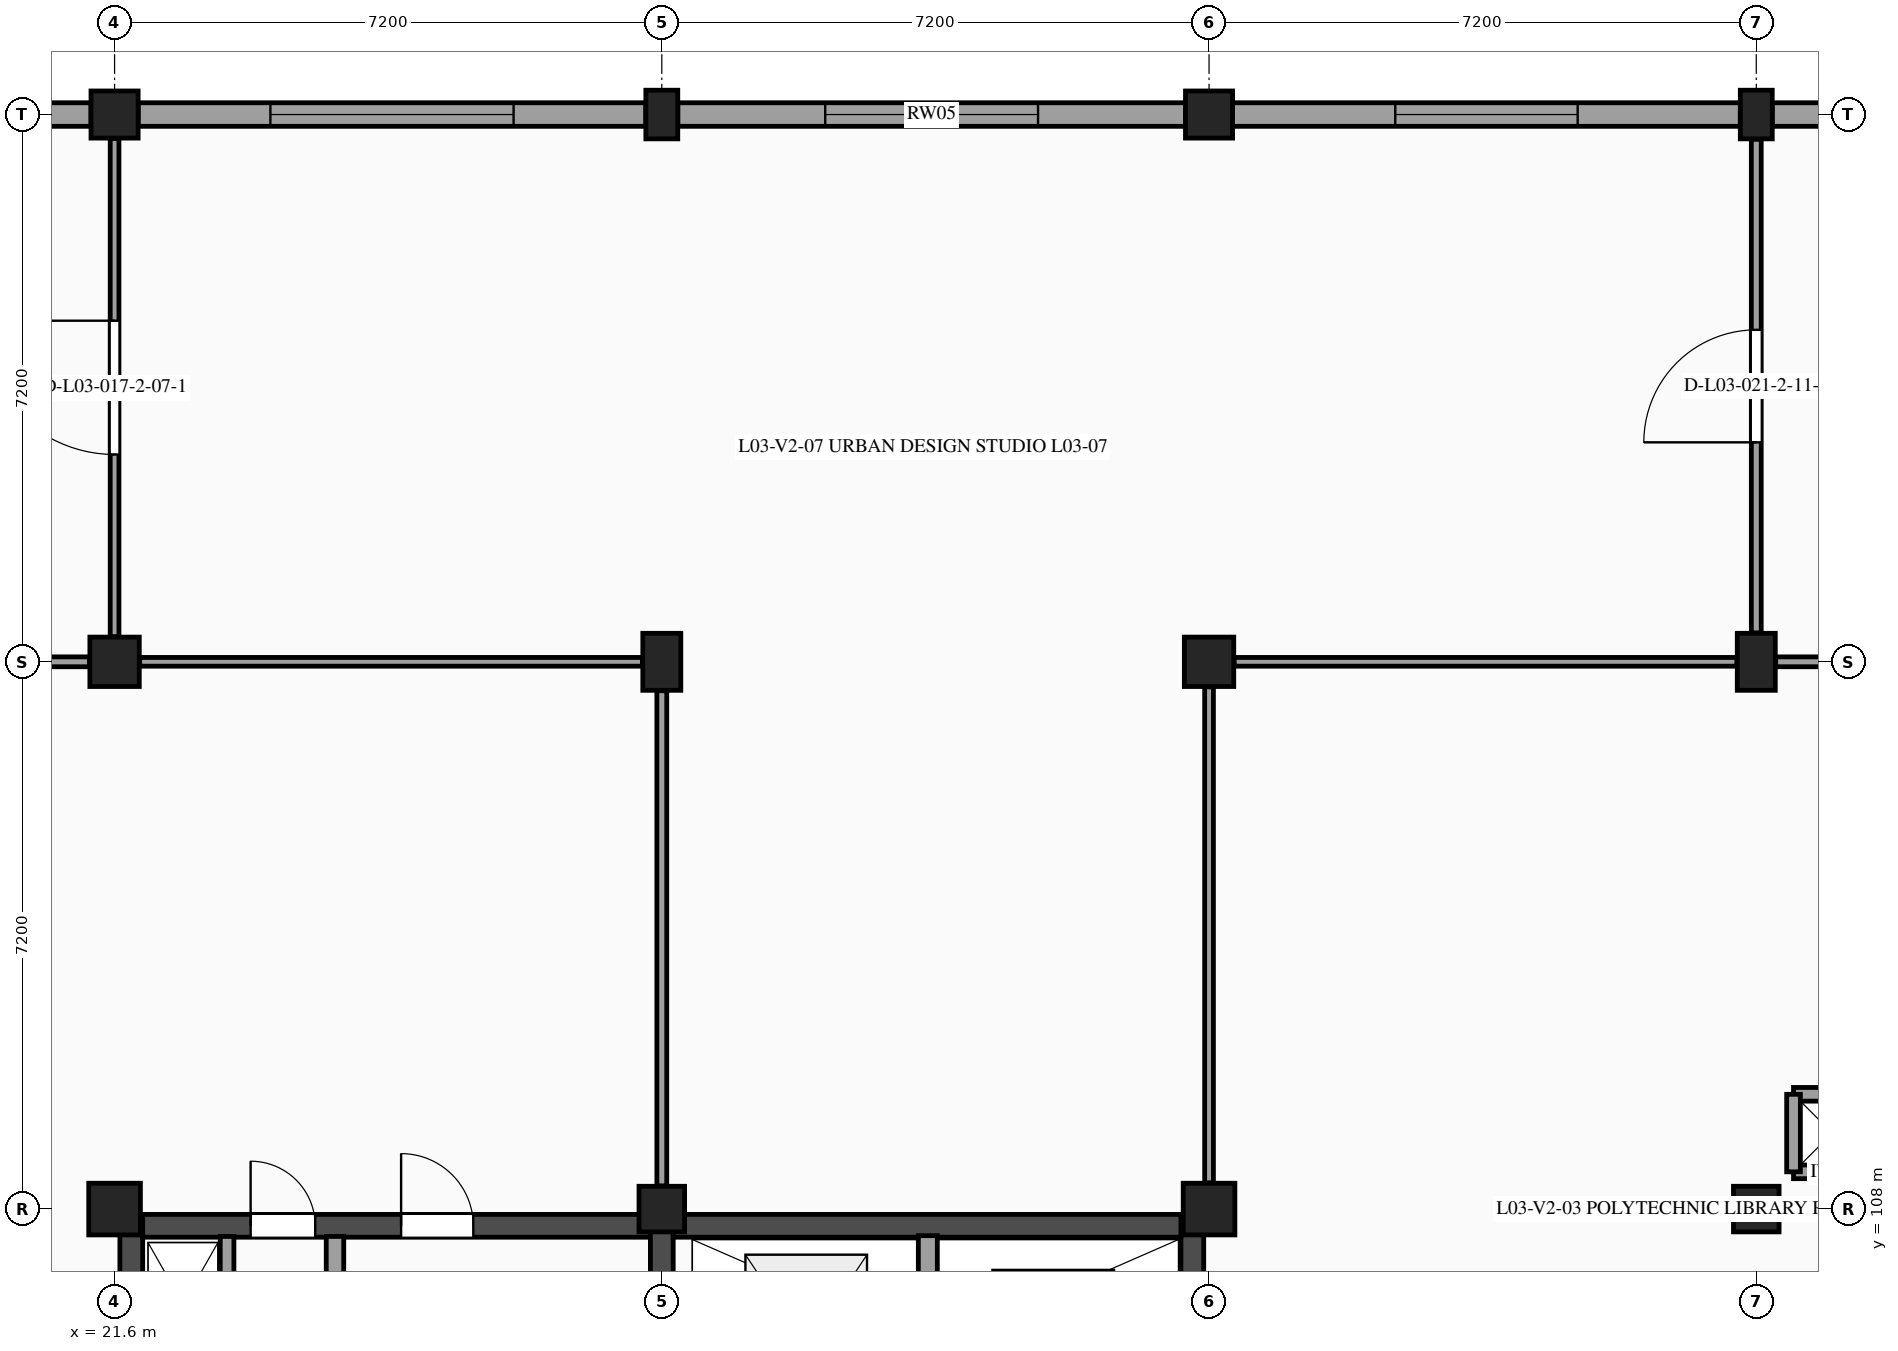
"""IFC4 building model, lengths in metres.
Left out: names, types, materials, properties, quantities, classifications, styles, units other than length and angle.
Written with IfcOpenShell. Run it as: python <this file> out.ifc"""

import sys

from ifc_helpers import new_model, si_unit, direction, frame, frame_2d, origin, origin_2d, place, context, subcontext, project, spatial, rectangle, extrude, element, fill, save


model = new_model("IFC4")
c1 = context("Model", 3, precision=1e-05, world=origin(), true_north=direction((0.0, 1.0)))
c2 = subcontext(c1, "Body", "Model", "MODEL_VIEW")
j1 = project(units=[si_unit("LENGTHUNIT", "METRE"), si_unit("PLANEANGLEUNIT", "RADIAN")], contexts=[c1])
p1 = place(None, origin())
s1 = spatial("IfcSite", under=j1, at=p1, CompositionType="ELEMENT")
p2 = place(p1, origin())
s2 = spatial("IfcBuilding", under=s1, at=p2, CompositionType="ELEMENT")
p3 = place(p2, frame((0.0, 0.0, 14.4)))
s3 = spatial("IfcBuildingStorey", under=s2, at=p3, CompositionType="ELEMENT", Elevation=14.4)
p4 = place(p3, frame((21.6, 108.0, 0.0), z_axis=(0.0, 0.0, 1.0), x_axis=(1.0, 0.0, 0.0)))
e1 = element("IfcColumn", 1, at=p4, inside=s3, PredefinedType="COLUMN", context=c2, shape_type="SweptSolid", body=[
    extrude(rectangle(XDim=0.68, YDim=0.68, at=origin_2d()), origin(), (0.0, 0.0, 1.0), 4.2),
])
p5 = place(p3, frame((21.6, 115.2, 0.0), z_axis=(0.0, 0.0, 1.0), x_axis=(1.0, 0.0, 0.0)))
e2 = element("IfcColumn", 2, at=p5, inside=s3, PredefinedType="COLUMN", context=c2, shape_type="SweptSolid", body=[
    extrude(rectangle(XDim=0.65, YDim=0.65, at=origin_2d()), origin(), (0.0, 0.0, 1.0), 4.2),
])
p6 = place(p3, frame((21.6, 122.4, 0.0), z_axis=(0.0, 0.0, 1.0), x_axis=(1.0, 0.0, 0.0)))
e3 = element("IfcColumn", 3, at=p6, inside=s3, PredefinedType="COLUMN", context=c2, shape_type="SweptSolid", body=[
    extrude(rectangle(XDim=0.62, YDim=0.62, at=origin_2d()), origin(), (0.0, 0.0, 1.0), 4.2),
])
p7 = place(p3, frame((28.8, 108.0, 0.0), z_axis=(0.0, 0.0, 1.0), x_axis=(1.0, 0.0, 0.0)))
e4 = element("IfcColumn", 4, at=p7, inside=s3, PredefinedType="COLUMN", context=c2, shape_type="SweptSolid", body=[
    extrude(rectangle(XDim=0.6, YDim=0.6, at=origin_2d()), origin(), (0.0, 0.0, 1.0), 4.2),
])
p8 = place(p3, frame((28.8, 115.2, 0.0), z_axis=(0.0, 0.0, 1.0), x_axis=(1.0, 0.0, 0.0)))
e5 = element("IfcColumn", 5, at=p8, inside=s3, PredefinedType="COLUMN", context=c2, shape_type="SweptSolid", body=[
    extrude(rectangle(XDim=0.5, YDim=0.75, at=origin_2d()), origin(), (0.0, 0.0, 1.0), 4.2),
])
p9 = place(p3, frame((28.8, 122.4, 0.0), z_axis=(0.0, 0.0, 1.0), x_axis=(1.0, 0.0, 0.0)))
e6 = element("IfcColumn", 6, at=p9, inside=s3, PredefinedType="PILASTER", context=c2, shape_type="SweptSolid", body=[
    extrude(rectangle(XDim=0.42, YDim=0.64, at=origin_2d()), origin(), (0.0, 0.0, 1.0), 4.2),
])
p10 = place(p3, frame((36.0, 108.0, 0.0), z_axis=(0.0, 0.0, 1.0), x_axis=(1.0, 0.0, 0.0)))
e7 = element("IfcColumn", 7, at=p10, inside=s3, PredefinedType="COLUMN", context=c2, shape_type="SweptSolid", body=[
    extrude(rectangle(XDim=0.68, YDim=0.68, at=origin_2d()), origin(), (0.0, 0.0, 1.0), 4.2),
])
p11 = place(p3, frame((36.0, 115.2, 0.0), z_axis=(0.0, 0.0, 1.0), x_axis=(1.0, 0.0, 0.0)))
e8 = element("IfcColumn", 8, at=p11, inside=s3, PredefinedType="COLUMN", context=c2, shape_type="SweptSolid", body=[
    extrude(rectangle(XDim=0.65, YDim=0.65, at=origin_2d()), origin(), (0.0, 0.0, 1.0), 4.2),
])
p12 = place(p3, frame((36.0, 122.4, 0.0), z_axis=(0.0, 0.0, 1.0), x_axis=(1.0, 0.0, 0.0)))
e9 = element("IfcColumn", 9, at=p12, inside=s3, PredefinedType="COLUMN", context=c2, shape_type="SweptSolid", body=[
    extrude(rectangle(XDim=0.62, YDim=0.62, at=origin_2d()), origin(), (0.0, 0.0, 1.0), 4.2),
])
p13 = place(p3, frame((43.2, 108.0, 0.0), z_axis=(0.0, 0.0, 1.0), x_axis=(1.0, 0.0, 0.0)))
e10 = element("IfcColumn", 10, at=p13, inside=s3, PredefinedType="COLUMN", context=c2, shape_type="SweptSolid", body=[
    extrude(rectangle(XDim=0.6, YDim=0.6, at=origin_2d()), origin(), (0.0, 0.0, 1.0), 4.2),
])
p14 = place(p3, frame((43.2, 115.2, 0.0), z_axis=(0.0, 0.0, 1.0), x_axis=(1.0, 0.0, 0.0)))
e11 = element("IfcColumn", 11, at=p14, inside=s3, PredefinedType="COLUMN", context=c2, shape_type="SweptSolid", body=[
    extrude(rectangle(XDim=0.5, YDim=0.75, at=origin_2d()), origin(), (0.0, 0.0, 1.0), 4.2),
])
p15 = place(p3, frame((43.2, 122.4, 0.0), z_axis=(0.0, 0.0, 1.0), x_axis=(1.0, 0.0, 0.0)))
e12 = element("IfcColumn", 12, at=p15, inside=s3, PredefinedType="PILASTER", context=c2, shape_type="SweptSolid", body=[
    extrude(rectangle(XDim=0.42, YDim=0.64, at=origin_2d()), origin(), (0.0, 0.0, 1.0), 4.2),
])
p16 = place(p3, frame((14.61, 122.4, 0.0), z_axis=(0.0, 0.0, 1.0), x_axis=(1.0, 0.0, 0.0)))
e13 = element("IfcWall", 13, at=p16, inside=s3, PredefinedType="STANDARD", context=c2, shape_type="SweptSolid", body=[
    extrude(rectangle(XDim=6.68, YDim=0.31, at=frame_2d((3.34, 0.0))), origin(), (0.0, 0.0, 1.0), 3.185),
])
p17 = place(p16, frame((1.54, 0.0, 0.98)))
e14 = element("IfcOpeningElement", 14, at=p17, cuts=e13, PredefinedType="OPENING", context=c2, shape_type="SweptSolid", body=[
    extrude(rectangle(XDim=3.6, YDim=1.5, at=frame_2d((1.8, 0.75))), frame((0.0, 0.165, 0.0), z_axis=(0.0, -1.0, 0.0), x_axis=(1.0, 0.0, 0.0)), (0.0, 0.0, 1.0), 0.33),
])
p18 = place(p3, frame((21.91, 122.4, 0.0), z_axis=(0.0, 0.0, 1.0), x_axis=(1.0, 0.0, 0.0)))
e15 = element("IfcWall", 15, at=p18, inside=s3, PredefinedType="STANDARD", context=c2, shape_type="SweptSolid", body=[
    extrude(rectangle(XDim=6.68, YDim=0.31, at=frame_2d((3.34, 0.0))), origin(), (0.0, 0.0, 1.0), 3.185),
])
p19 = place(p18, frame((1.74, 0.0, 0.98)))
e16 = element("IfcOpeningElement", 16, at=p19, cuts=e15, PredefinedType="OPENING", context=c2, shape_type="SweptSolid", body=[
    extrude(rectangle(XDim=3.2, YDim=1.45, at=frame_2d((1.6, 0.725))), frame((0.0, 0.165, 0.0), z_axis=(0.0, -1.0, 0.0), x_axis=(1.0, 0.0, 0.0)), (0.0, 0.0, 1.0), 0.33),
])
p20 = place(p3, frame((29.01, 122.4, 0.0), z_axis=(0.0, 0.0, 1.0), x_axis=(1.0, 0.0, 0.0)))
e17 = element("IfcWall", 17, at=p20, inside=s3, PredefinedType="STANDARD", context=c2, shape_type="SweptSolid", body=[
    extrude(rectangle(XDim=6.68, YDim=0.31, at=frame_2d((3.34, 0.0))), origin(), (0.0, 0.0, 1.0), 3.185),
])
p21 = place(p20, frame((1.94, 0.0, 0.98)))
e18 = element("IfcOpeningElement", 18, at=p21, cuts=e17, PredefinedType="OPENING", context=c2, shape_type="SweptSolid", body=[
    extrude(rectangle(XDim=2.8, YDim=1.45, at=frame_2d((1.4, 0.725))), frame((0.0, 0.165, 0.0), z_axis=(0.0, -1.0, 0.0), x_axis=(1.0, 0.0, 0.0)), (0.0, 0.0, 1.0), 0.33),
])
p22 = place(p3, frame((36.31, 122.4, 0.0), z_axis=(0.0, 0.0, 1.0), x_axis=(1.0, 0.0, 0.0)))
e19 = element("IfcWall", 19, at=p22, inside=s3, PredefinedType="STANDARD", context=c2, shape_type="SweptSolid", body=[
    extrude(rectangle(XDim=6.68, YDim=0.31, at=frame_2d((3.34, 0.0))), origin(), (0.0, 0.0, 1.0), 3.185),
])
p23 = place(p22, frame((2.14, 0.0, 0.98)))
e20 = element("IfcOpeningElement", 20, at=p23, cuts=e19, PredefinedType="OPENING", context=c2, shape_type="SweptSolid", body=[
    extrude(rectangle(XDim=2.4, YDim=1.4, at=frame_2d((1.2, 0.7))), frame((0.0, 0.165, 0.0), z_axis=(0.0, -1.0, 0.0), x_axis=(1.0, 0.0, 0.0)), (0.0, 0.0, 1.0), 0.33),
])
p24 = place(p3, frame((43.41, 122.4, 0.0), z_axis=(0.0, 0.0, 1.0), x_axis=(1.0, 0.0, 0.0)))
e21 = element("IfcWall", 21, at=p24, inside=s3, PredefinedType="STANDARD", context=c2, shape_type="SweptSolid", body=[
    extrude(rectangle(XDim=6.68, YDim=0.31, at=frame_2d((3.34, 0.0))), origin(), (0.0, 0.0, 1.0), 3.185),
])
p25 = place(p24, frame((0.94, 0.0, 0.98)))
e22 = element("IfcOpeningElement", 22, at=p25, cuts=e21, PredefinedType="OPENING", context=c2, shape_type="SweptSolid", body=[
    extrude(rectangle(XDim=4.8, YDim=1.8, at=frame_2d((2.4, 0.9))), frame((0.0, 0.165, 0.0), z_axis=(0.0, -1.0, 0.0), x_axis=(1.0, 0.0, 0.0)), (0.0, 0.0, 1.0), 0.33),
])
p26 = place(p3, frame((21.82, 107.93, 0.0), z_axis=(0.0, 0.0, 1.0), x_axis=(0.0, -1.0, 0.0)))
e23 = element("IfcWall", 23, at=p26, inside=s3, PredefinedType="SHEAR", context=c2, shape_type="SweptSolid", body=[
    extrude(rectangle(XDim=7.06, YDim=0.3, at=frame_2d((3.53, 0.0))), origin(), (0.0, 0.0, 1.0), 3.94),
])
p27 = place(p3, frame((21.97, 107.78, 0.0), z_axis=(0.0, 0.0, 1.0), x_axis=(1.0, 0.0, 0.0)))
e24 = element("IfcWall", 24, at=p27, inside=s3, PredefinedType="SHEAR", context=c2, shape_type="SweptSolid", body=[
    extrude(rectangle(XDim=6.68, YDim=0.3, at=frame_2d((3.34, 0.0))), origin(), (0.0, 0.0, 1.0), 3.94),
])
p28 = place(p27, frame((1.42, 0.0, 0.0)))
e25 = element("IfcOpeningElement", 25, at=p28, cuts=e24, PredefinedType="OPENING", context=c2, shape_type="SweptSolid", body=[
    extrude(rectangle(XDim=0.85, YDim=2.1, at=frame_2d((0.425, 1.05))), frame((0.0, 0.16, 0.0), z_axis=(0.0, -1.0, 0.0), x_axis=(1.0, 0.0, 0.0)), (0.0, 0.0, 1.0), 0.32),
])
p29 = place(p27, frame((3.4, 0.0, 0.0)))
e26 = element("IfcOpeningElement", 26, at=p29, cuts=e24, PredefinedType="OPENING", context=c2, shape_type="SweptSolid", body=[
    extrude(rectangle(XDim=0.95, YDim=2.15, at=frame_2d((0.475, 1.075))), frame((0.0, 0.16, 0.0), z_axis=(0.0, -1.0, 0.0), x_axis=(1.0, 0.0, 0.0)), (0.0, 0.0, 1.0), 0.32),
])
p30 = place(p3, frame((24.5, 105.9, 0.0), z_axis=(0.0, 0.0, 1.0), x_axis=(0.0, 1.0, 0.0)))
e27 = element("IfcWall", 27, at=p30, inside=s3, PredefinedType="PARTITIONING", context=c2, shape_type="SweptSolid", body=[
    extrude(rectangle(XDim=1.74, YDim=0.23, at=frame_2d((0.87, 0.0))), origin(), (0.0, 0.0, 1.0), 3.94),
])
p31 = place(p3, frame((23.08, 105.88, 0.0), z_axis=(0.0, 0.0, 1.0), x_axis=(0.0, 1.0, 0.0)))
e28 = element("IfcWall", 28, at=p31, inside=s3, PredefinedType="PARTITIONING", context=c2, shape_type="SweptSolid", body=[
    extrude(rectangle(XDim=1.76, YDim=0.18, at=frame_2d((0.88, 0.0))), origin(), (0.0, 0.0, 1.0), 3.94),
])
p32 = place(p3, frame((28.8, 100.87, 0.0), z_axis=(0.0, 0.0, 1.0), x_axis=(0.0, 1.0, 0.0)))
e29 = element("IfcWall", 29, at=p32, inside=s3, PredefinedType="SHEAR", context=c2, shape_type="SweptSolid", body=[
    extrude(rectangle(XDim=7.06, YDim=0.3, at=frame_2d((3.53, 0.0))), origin(), (0.0, 0.0, 1.0), 3.94),
])
p33 = place(p32, frame((1.4, 0.0, 0.0)))
e30 = element("IfcOpeningElement", 30, at=p33, cuts=e29, PredefinedType="OPENING", context=c2, shape_type="SweptSolid", body=[
    extrude(rectangle(XDim=1.8, YDim=2.2, at=frame_2d((0.9, 1.1))), frame((0.0, 0.16, 0.0), z_axis=(0.0, -1.0, 0.0), x_axis=(1.0, 0.0, 0.0)), (0.0, 0.0, 1.0), 0.32),
])
p34 = place(p3, frame((35.78, 100.87, 0.0), z_axis=(0.0, 0.0, 1.0), x_axis=(0.0, 1.0, 0.0)))
e31 = element("IfcWall", 31, at=p34, inside=s3, PredefinedType="SHEAR", context=c2, shape_type="SweptSolid", body=[
    extrude(rectangle(XDim=7.06, YDim=0.3, at=frame_2d((3.53, 0.0))), origin(), (0.0, 0.0, 1.0), 3.94),
])
p35 = place(p3, frame((28.95, 107.78, 0.0), z_axis=(0.0, 0.0, 1.0), x_axis=(1.0, 0.0, 0.0)))
e32 = element("IfcWall", 32, at=p35, inside=s3, PredefinedType="SHEAR", context=c2, shape_type="SweptSolid", body=[
    extrude(rectangle(XDim=6.68, YDim=0.3, at=frame_2d((3.34, 0.0))), origin(), (0.0, 0.0, 1.0), 3.94),
])
p36 = place(p3, frame((32.3, 104.78, 0.0), z_axis=(0.0, 0.0, 1.0), x_axis=(0.0, 1.0, 0.0)))
e33 = element("IfcWall", 33, at=p36, inside=s3, PredefinedType="PARTITIONING", context=c2, shape_type="SweptSolid", body=[
    extrude(rectangle(XDim=2.87, YDim=0.25, at=frame_2d((1.435, 0.0))), origin(), (0.0, 0.0, 1.0), 3.94),
])
for number, where, z_axis, x_axis in (
    (34, (43.69, 108.49, 0.0), (0.0, 0.0, 1.0), (1.0, 0.0, 0.0)),
    (35, (44.71, 109.51, 0.0), (0.0, 0.0, 1.0), (-1.0, 0.0, 0.0)),
    (36, (43.69, 109.51, 0.0), (0.0, 0.0, 1.0), (0.0, -1.0, 0.0)),
):
    element("IfcWall", number, at=place(p3, frame(where, z_axis=z_axis, x_axis=x_axis)), inside=s3, PredefinedType="PARTITIONING", context=c2, shape_type="SweptSolid", body=[
        extrude(rectangle(XDim=1.02, YDim=0.18, at=frame_2d((0.51, 0.0))), origin(), (0.0, 0.0, 1.0), 3.94),
    ])
p37 = place(p3, frame((14.655, 115.2, 0.0), z_axis=(0.0, 0.0, 1.0), x_axis=(1.0, 0.0, 0.0)))
e37 = element("IfcWall", 37, at=p37, inside=s3, PredefinedType="PARTITIONING", context=c2, shape_type="SweptSolid", body=[
    extrude(rectangle(XDim=6.615, YDim=0.13, at=frame_2d((3.308, 0.0))), origin(), (0.0, 0.0, 1.0), 3.24),
])
p38 = place(p3, frame((21.6, 115.53, 0.0), z_axis=(0.0, 0.0, 1.0), x_axis=(0.0, 1.0, 0.0)))
e38 = element("IfcWall", 38, at=p38, inside=s3, PredefinedType="PARTITIONING", context=c2, shape_type="SweptSolid", body=[
    extrude(rectangle(XDim=6.555, YDim=0.115, at=frame_2d((3.277, 0.0))), origin(), (0.0, 0.0, 1.0), 3.245),
])
p39 = place(p38, frame((2.397, 0.0, 0.0)))
e39 = element("IfcOpeningElement", 39, at=p39, cuts=e38, PredefinedType="OPENING", context=c2, shape_type="SweptSolid", body=[
    extrude(rectangle(XDim=1.76, YDim=2.3, at=frame_2d((0.88, 1.15))), frame((0.0, 0.067, 0.0), z_axis=(0.0, -1.0, 0.0), x_axis=(1.0, 0.0, 0.0)), (0.0, 0.0, 1.0), 0.135),
])
p40 = place(p3, frame((28.8, 108.305, 0.0), z_axis=(0.0, 0.0, 1.0), x_axis=(0.0, 1.0, 0.0)))
e40 = element("IfcWall", 40, at=p40, inside=s3, PredefinedType="PARTITIONING", context=c2, shape_type="SweptSolid", body=[
    extrude(rectangle(XDim=6.515, YDim=0.13, at=frame_2d((3.258, 0.0))), origin(), (0.0, 0.0, 1.0), 3.245),
])
p41 = place(p3, frame((21.93, 115.2, 0.0), z_axis=(0.0, 0.0, 1.0), x_axis=(1.0, 0.0, 0.0)))
e41 = element("IfcWall", 41, at=p41, inside=s3, PredefinedType="PARTITIONING", context=c2, shape_type="SweptSolid", body=[
    extrude(rectangle(XDim=6.615, YDim=0.115, at=frame_2d((3.308, 0.0))), origin(), (0.0, 0.0, 1.0), 3.28),
])
p42 = place(p3, frame((36.0, 108.345, 0.0), z_axis=(0.0, 0.0, 1.0), x_axis=(0.0, 1.0, 0.0)))
e42 = element("IfcWall", 42, at=p42, inside=s3, PredefinedType="PARTITIONING", context=c2, shape_type="SweptSolid", body=[
    extrude(rectangle(XDim=6.525, YDim=0.115, at=frame_2d((3.263, 0.0))), origin(), (0.0, 0.0, 1.0), 3.245),
])
p43 = place(p3, frame((36.33, 115.2, 0.0), z_axis=(0.0, 0.0, 1.0), x_axis=(1.0, 0.0, 0.0)))
e43 = element("IfcWall", 43, at=p43, inside=s3, PredefinedType="PARTITIONING", context=c2, shape_type="SweptSolid", body=[
    extrude(rectangle(XDim=6.615, YDim=0.115, at=frame_2d((3.308, 0.0))), origin(), (0.0, 0.0, 1.0), 3.3),
])
p44 = place(p3, frame((43.2, 115.58, 0.0), z_axis=(0.0, 0.0, 1.0), x_axis=(0.0, 1.0, 0.0)))
e44 = element("IfcWall", 44, at=p44, inside=s3, PredefinedType="PARTITIONING", context=c2, shape_type="SweptSolid", body=[
    extrude(rectangle(XDim=6.495, YDim=0.13, at=frame_2d((3.248, 0.0))), origin(), (0.0, 0.0, 1.0), 3.245),
])
p45 = place(p44, frame((2.508, 0.0, 0.0)))
e45 = element("IfcOpeningElement", 45, at=p45, cuts=e44, PredefinedType="OPENING", context=c2, shape_type="SweptSolid", body=[
    extrude(rectangle(XDim=1.48, YDim=2.28, at=frame_2d((0.74, 1.14))), frame((0.0, 0.075, 0.0), z_axis=(0.0, -1.0, 0.0), x_axis=(1.0, 0.0, 0.0)), (0.0, 0.0, 1.0), 0.15),
])
p46 = place(p3, frame((43.455, 115.2, 0.0), z_axis=(0.0, 0.0, 1.0), x_axis=(1.0, 0.0, 0.0)))
e46 = element("IfcWall", 46, at=p46, inside=s3, PredefinedType="PARTITIONING", context=c2, shape_type="SweptSolid", body=[
    extrude(rectangle(XDim=6.615, YDim=0.13, at=frame_2d((3.308, 0.0))), origin(), (0.0, 0.0, 1.0), 3.14),
])
p47 = place(p19, origin())
e47 = element("IfcWindow", 47, at=p47, inside=s3, PartitioningType="SINGLE_PANEL", PredefinedType="WINDOW", context=c2, shape_type="SweptSolid", body=[
    extrude(rectangle(XDim=3.2, YDim=1.45, at=frame_2d((1.6, 0.725))), frame((0.0, -0.03, 0.0), z_axis=(0.0, -1.0, 0.0), x_axis=(1.0, 0.0, 0.0)), (0.0, 0.0, 1.0), 0.06),
])
fill(e16, e47)
p48 = place(p21, origin())
e48 = element("IfcWindow", 48, at=p48, inside=s3, PartitioningType="SINGLE_PANEL", PredefinedType="WINDOW", context=c2, shape_type="SweptSolid", body=[
    extrude(rectangle(XDim=2.8, YDim=1.45, at=frame_2d((1.4, 0.725))), frame((0.0, -0.03, 0.0), z_axis=(0.0, -1.0, 0.0), x_axis=(1.0, 0.0, 0.0)), (0.0, 0.0, 1.0), 0.06),
])
fill(e18, e48)
p49 = place(p23, origin())
e49 = element("IfcWindow", 49, at=p49, inside=s3, PartitioningType="SINGLE_PANEL", PredefinedType="WINDOW", context=c2, shape_type="SweptSolid", body=[
    extrude(rectangle(XDim=2.4, YDim=1.4, at=frame_2d((1.2, 0.7))), frame((0.0, -0.03, 0.0), z_axis=(0.0, -1.0, 0.0), x_axis=(1.0, 0.0, 0.0)), (0.0, 0.0, 1.0), 0.06),
])
fill(e20, e49)
p50 = place(p28, origin())
e50 = element("IfcDoor", 50, at=p50, inside=s3, OperationType="SINGLE_SWING_LEFT", PredefinedType="DOOR", context=c2, shape_type="SweptSolid", body=[
    extrude(rectangle(XDim=0.85, YDim=2.1, at=frame_2d((0.425, 1.05))), frame((0.0, 0.025, 0.0), z_axis=(0.0, -1.0, 0.0), x_axis=(1.0, 0.0, 0.0)), (0.0, 0.0, 1.0), 0.05),
])
fill(e25, e50)
p51 = place(p29, origin())
e51 = element("IfcDoor", 51, at=p51, inside=s3, OperationType="SINGLE_SWING_LEFT", PredefinedType="DOOR", context=c2, shape_type="SweptSolid", body=[
    extrude(rectangle(XDim=0.95, YDim=2.15, at=frame_2d((0.475, 1.075))), frame((0.0, 0.025, 0.0), z_axis=(0.0, -1.0, 0.0), x_axis=(1.0, 0.0, 0.0)), (0.0, 0.0, 1.0), 0.05),
])
fill(e26, e51)
p52 = place(p39, origin())
e52 = element("IfcDoor", 52, at=p52, inside=s3, OperationType="SINGLE_SWING_RIGHT", PredefinedType="DOOR", context=c2, shape_type="SweptSolid", body=[
    extrude(rectangle(XDim=1.76, YDim=2.3, at=frame_2d((0.88, 1.15))), frame((0.0, 0.025, 0.0), z_axis=(0.0, -1.0, 0.0), x_axis=(1.0, 0.0, 0.0)), (0.0, 0.0, 1.0), 0.05),
])
fill(e39, e52)
p53 = place(p45, origin())
e53 = element("IfcDoor", 53, at=p53, inside=s3, OperationType="SINGLE_SWING_LEFT", PredefinedType="DOOR", context=c2, shape_type="SweptSolid", body=[
    extrude(rectangle(XDim=1.48, YDim=2.28, at=frame_2d((0.74, 1.14))), frame((0.0, 0.025, 0.0), z_axis=(0.0, -1.0, 0.0), x_axis=(1.0, 0.0, 0.0)), (0.0, 0.0, 1.0), 0.05),
])
fill(e45, e53)
save(model, sys.argv[1])
